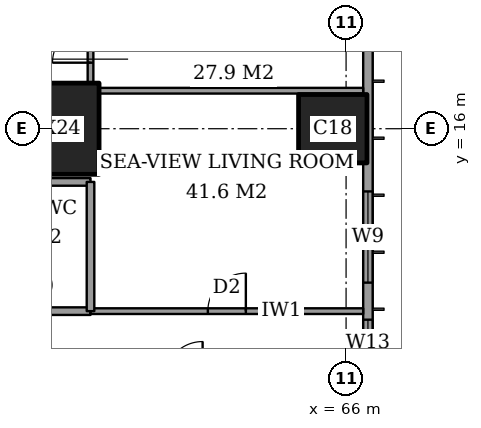
"""IFC4 building model, lengths in metres.
Left out: names, types, materials, properties, quantities, classifications, styles, units other than length and angle.
Written with IfcOpenShell. Run it as: python <this file> out.ifc"""

import sys

from ifc_helpers import new_model, si_unit, direction, frame, frame_2d, origin, origin_2d, place, context, subcontext, project, spatial, rectangle, extrude, element, fill, save


model = new_model("IFC4")
c1 = context("Model", 3, precision=1e-05, world=origin(), true_north=direction((0.0, 1.0)))
c2 = subcontext(c1, "Body", "Model", "MODEL_VIEW")
j1 = project(units=[si_unit("LENGTHUNIT", "METRE"), si_unit("PLANEANGLEUNIT", "RADIAN")], contexts=[c1])
p1 = place(None, origin())
s1 = spatial("IfcSite", under=j1, at=p1, CompositionType="ELEMENT")
p2 = place(p1, origin())
s2 = spatial("IfcBuilding", under=s1, at=p2, CompositionType="ELEMENT")
p3 = place(p2, frame((0.0, 0.0, 203.8)))
s3 = spatial("IfcBuildingStorey", under=s2, at=p3, CompositionType="ELEMENT", Elevation=203.8)
p4 = place(p3, frame((58.0, 16.0, 0.0), z_axis=(0.0, 0.0, 1.0), x_axis=(1.0, 0.0, 0.0)))
e1 = element("IfcColumn", 1, at=p4, inside=s3, PredefinedType="COLUMN", context=c2, shape_type="SweptSolid", body=[
    extrude(rectangle(XDim=3.0, YDim=2.4, at=origin_2d()), origin(), (0.0, 0.0, 1.0), 3.6),
])
p5 = place(p3, frame((65.65, 16.0, 0.0), z_axis=(0.0, 0.0, 1.0), x_axis=(1.0, 0.0, 0.0)))
e2 = element("IfcColumn", 2, at=p5, inside=s3, PredefinedType="COLUMN", context=c2, shape_type="SweptSolid", body=[
    extrude(rectangle(XDim=1.8, YDim=1.8, at=origin_2d()), origin(), (0.0, 0.0, 1.0), 3.6),
])
p6 = place(p3, frame((66.575, 3.175, 0.0), z_axis=(0.0, 0.0, 1.0), x_axis=(0.0, 1.0, 0.0)))
e3 = element("IfcWall", 3, at=p6, inside=s3, PredefinedType="SOLIDWALL", context=c2, shape_type="SweptSolid", body=[
    extrude(rectangle(XDim=41.65, YDim=0.25, at=frame_2d((20.825, 0.0))), origin(), (0.0, 0.0, 1.0), 3.6),
])
p7 = place(p6, frame((0.825, 0.0, 0.2)))
e4 = element("IfcOpeningElement", 4, at=p7, cuts=e3, PredefinedType="OPENING", context=c2, shape_type="SweptSolid", body=[
    extrude(rectangle(XDim=2.4, YDim=2.4, at=frame_2d((1.2, 1.2))), frame((0.0, 0.135, 0.0), z_axis=(0.0, -1.0, 0.0), x_axis=(1.0, 0.0, 0.0)), (0.0, 0.0, 1.0), 0.27),
])
p8 = place(p6, frame((6.6, 0.0, 0.2)))
e5 = element("IfcOpeningElement", 5, at=p8, cuts=e3, PredefinedType="OPENING", context=c2, shape_type="SweptSolid", body=[
    extrude(rectangle(XDim=1.2, YDim=2.4, at=frame_2d((0.6, 1.2))), frame((0.0, 0.135, 0.0), z_axis=(0.0, -1.0, 0.0), x_axis=(1.0, 0.0, 0.0)), (0.0, 0.0, 1.0), 0.27),
])
p9 = place(p6, frame((8.775, 0.0, 0.2)))
e6 = element("IfcOpeningElement", 6, at=p9, cuts=e3, PredefinedType="OPENING", context=c2, shape_type="SweptSolid", body=[
    extrude(rectangle(XDim=2.4, YDim=2.4, at=frame_2d((1.2, 1.2))), frame((0.0, 0.135, 0.0), z_axis=(0.0, -1.0, 0.0), x_axis=(1.0, 0.0, 0.0)), (0.0, 0.0, 1.0), 0.27),
])
p10 = place(p6, frame((15.675, 0.0, 0.2)))
e7 = element("IfcOpeningElement", 7, at=p10, cuts=e3, PredefinedType="OPENING", context=c2, shape_type="SweptSolid", body=[
    extrude(rectangle(XDim=2.4, YDim=2.4, at=frame_2d((1.2, 1.2))), frame((0.0, 0.135, 0.0), z_axis=(0.0, -1.0, 0.0), x_axis=(1.0, 0.0, 0.0)), (0.0, 0.0, 1.0), 0.27),
])
p11 = place(p6, frame((23.575, 0.0, 0.2)))
e8 = element("IfcOpeningElement", 8, at=p11, cuts=e3, PredefinedType="OPENING", context=c2, shape_type="SweptSolid", body=[
    extrude(rectangle(XDim=2.4, YDim=2.4, at=frame_2d((1.2, 1.2))), frame((0.0, 0.135, 0.0), z_axis=(0.0, -1.0, 0.0), x_axis=(1.0, 0.0, 0.0)), (0.0, 0.0, 1.0), 0.27),
])
p12 = place(p6, frame((30.675, 0.0, 0.2)))
e9 = element("IfcOpeningElement", 9, at=p12, cuts=e3, PredefinedType="OPENING", context=c2, shape_type="SweptSolid", body=[
    extrude(rectangle(XDim=2.4, YDim=2.4, at=frame_2d((1.2, 1.2))), frame((0.0, 0.135, 0.0), z_axis=(0.0, -1.0, 0.0), x_axis=(1.0, 0.0, 0.0)), (0.0, 0.0, 1.0), 0.27),
])
p13 = place(p6, frame((34.325, 0.0, 0.2)))
e10 = element("IfcOpeningElement", 10, at=p13, cuts=e3, PredefinedType="OPENING", context=c2, shape_type="SweptSolid", body=[
    extrude(rectangle(XDim=1.2, YDim=2.4, at=frame_2d((0.6, 1.2))), frame((0.0, 0.135, 0.0), z_axis=(0.0, -1.0, 0.0), x_axis=(1.0, 0.0, 0.0)), (0.0, 0.0, 1.0), 0.27),
])
p14 = place(p6, frame((38.425, 0.0, 0.2)))
e11 = element("IfcOpeningElement", 11, at=p14, cuts=e3, PredefinedType="OPENING", context=c2, shape_type="SweptSolid", body=[
    extrude(rectangle(XDim=2.4, YDim=2.4, at=frame_2d((1.2, 1.2))), frame((0.0, 0.135, 0.0), z_axis=(0.0, -1.0, 0.0), x_axis=(1.0, 0.0, 0.0)), (0.0, 0.0, 1.0), 0.27),
])
p15 = place(p3, frame((55.6, 11.2, 0.0), z_axis=(0.0, 0.0, 1.0), x_axis=(1.0, 0.0, 0.0)))
e12 = element("IfcWall", 12, at=p15, inside=s3, PredefinedType="PARTITIONING", context=c2, shape_type="SweptSolid", body=[
    extrude(rectangle(XDim=3.675, YDim=0.2, at=frame_2d((1.837, 0.0))), origin(), (0.0, 0.0, 1.0), 3.35),
])
p16 = place(p15, frame((1.387, 0.0, 0.0)))
e13 = element("IfcOpeningElement", 13, at=p16, cuts=e12, PredefinedType="OPENING", context=c2, shape_type="SweptSolid", body=[
    extrude(rectangle(XDim=0.9, YDim=2.1, at=frame_2d((0.45, 1.05))), frame((0.0, 0.11, 0.0), z_axis=(0.0, -1.0, 0.0), x_axis=(1.0, 0.0, 0.0)), (0.0, 0.0, 1.0), 0.22),
])
p17 = place(p3, frame((59.275, 11.2, 0.0), z_axis=(0.0, 0.0, 1.0), x_axis=(1.0, 0.0, 0.0)))
e14 = element("IfcWall", 14, at=p17, inside=s3, PredefinedType="PARTITIONING", context=c2, shape_type="SweptSolid", body=[
    extrude(rectangle(XDim=7.175, YDim=0.15, at=frame_2d((3.587, 0.0))), origin(), (0.0, 0.0, 1.0), 3.35),
])
p18 = place(p17, frame((3.087, 0.0, 0.0)))
e15 = element("IfcOpeningElement", 15, at=p18, cuts=e14, PredefinedType="OPENING", context=c2, shape_type="SweptSolid", body=[
    extrude(rectangle(XDim=1.0, YDim=2.1, at=frame_2d((0.5, 1.05))), frame((0.0, 0.085, 0.0), z_axis=(0.0, -1.0, 0.0), x_axis=(1.0, 0.0, 0.0)), (0.0, 0.0, 1.0), 0.17),
])
p19 = place(p3, frame((55.6, 14.6, 0.0), z_axis=(0.0, 0.0, 1.0), x_axis=(1.0, 0.0, 0.0)))
e16 = element("IfcWall", 16, at=p19, inside=s3, PredefinedType="PARTITIONING", context=c2, shape_type="SweptSolid", body=[
    extrude(rectangle(XDim=3.675, YDim=0.2, at=frame_2d((1.837, 0.0))), origin(), (0.0, 0.0, 1.0), 3.35),
])
p20 = place(p3, frame((59.5, 17.0, 0.0), z_axis=(0.0, 0.0, 1.0), x_axis=(1.0, 0.0, 0.0)))
e17 = element("IfcWall", 17, at=p20, inside=s3, PredefinedType="PARTITIONING", context=c2, shape_type="SweptSolid", body=[
    extrude(rectangle(XDim=6.95, YDim=0.15, at=frame_2d((3.475, 0.0))), origin(), (0.0, 0.0, 1.0), 3.35),
])
p21 = place(p3, frame((59.275, 11.2, 0.0), z_axis=(0.0, 0.0, 1.0), x_axis=(0.0, 1.0, 0.0)))
e18 = element("IfcWall", 18, at=p21, inside=s3, PredefinedType="PARTITIONING", context=c2, shape_type="SweptSolid", body=[
    extrude(rectangle(XDim=3.4, YDim=0.2, at=frame_2d((1.7, 0.0))), origin(), (0.0, 0.0, 1.0), 3.35),
])
p22 = place(p3, frame((59.275, 17.2, 0.0), z_axis=(0.0, 0.0, 1.0), x_axis=(0.0, 1.0, 0.0)))
e19 = element("IfcWall", 19, at=p22, inside=s3, PredefinedType="PARTITIONING", context=c2, shape_type="SweptSolid", body=[
    extrude(rectangle(XDim=2.45, YDim=0.15, at=frame_2d((1.225, 0.0))), origin(), (0.0, 0.0, 1.0), 3.35),
])
p23 = place(p22, frame((0.538, 0.0, 0.0)))
e20 = element("IfcOpeningElement", 20, at=p23, cuts=e19, PredefinedType="OPENING", context=c2, shape_type="SweptSolid", body=[
    extrude(rectangle(XDim=1.0, YDim=2.1, at=frame_2d((0.5, 1.05))), frame((0.0, 0.085, 0.0), z_axis=(0.0, -1.0, 0.0), x_axis=(1.0, 0.0, 0.0)), (0.0, 0.0, 1.0), 0.17),
])
p24 = place(p8, origin())
e21 = element("IfcWindow", 21, at=p24, inside=s3, PartitioningType="SINGLE_PANEL", PredefinedType="WINDOW", context=c2, shape_type="SweptSolid", body=[
    extrude(rectangle(XDim=1.2, YDim=2.4, at=frame_2d((0.6, 1.2))), frame((0.0, 0.03, 0.0), z_axis=(0.0, -1.0, 0.0), x_axis=(1.0, 0.0, 0.0)), (0.0, 0.0, 1.0), 0.06),
])
fill(e5, e21)
p25 = place(p9, origin())
e22 = element("IfcWindow", 22, at=p25, inside=s3, PartitioningType="SINGLE_PANEL", PredefinedType="WINDOW", context=c2, shape_type="SweptSolid", body=[
    extrude(rectangle(XDim=2.4, YDim=2.4, at=frame_2d((1.2, 1.2))), frame((0.0, 0.03, 0.0), z_axis=(0.0, -1.0, 0.0), x_axis=(1.0, 0.0, 0.0)), (0.0, 0.0, 1.0), 0.06),
])
fill(e6, e22)
p26 = place(p18, origin())
e23 = element("IfcDoor", 23, at=p26, inside=s3, OperationType="SINGLE_SWING_LEFT", PredefinedType="DOOR", context=c2, shape_type="SweptSolid", body=[
    extrude(rectangle(XDim=1.0, YDim=2.1, at=frame_2d((0.5, 1.05))), frame((0.0, 0.025, 0.0), z_axis=(0.0, -1.0, 0.0), x_axis=(1.0, 0.0, 0.0)), (0.0, 0.0, 1.0), 0.05),
])
fill(e15, e23)
p27 = place(p23, origin())
e24 = element("IfcDoor", 24, at=p27, inside=s3, OperationType="SINGLE_SWING_RIGHT", PredefinedType="DOOR", context=c2, shape_type="SweptSolid", body=[
    extrude(rectangle(XDim=1.0, YDim=2.1, at=frame_2d((0.5, 1.05))), frame((0.0, 0.025, 0.0), z_axis=(0.0, -1.0, 0.0), x_axis=(1.0, 0.0, 0.0)), (0.0, 0.0, 1.0), 0.05),
])
fill(e20, e24)
save(model, sys.argv[1])
